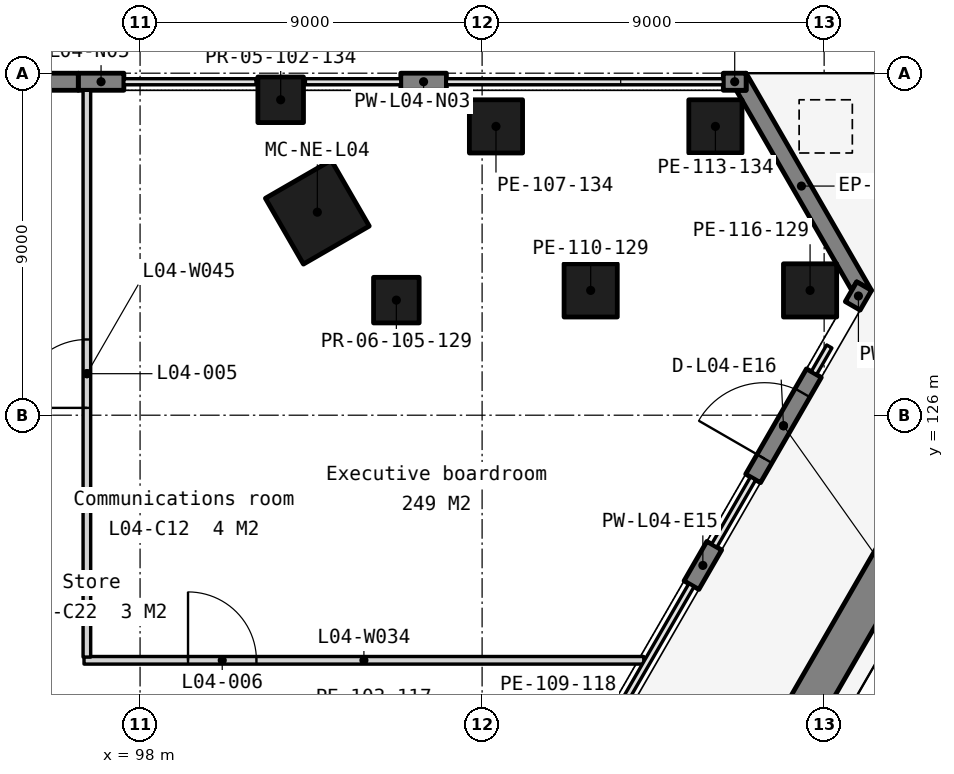
"""IFC4 building model, lengths in metres.
Left out: names, types, materials, properties, quantities, classifications, styles, units other than length and angle.
Written with IfcOpenShell. Run it as: python <this file> out.ifc"""

import sys

from ifc_helpers import new_model, si_unit, direction, frame, frame_2d, origin, origin_2d, place, context, subcontext, project, spatial, polyline, rectangle, outline, extrude, element, fill, save


model = new_model("IFC4")
c1 = context("Model", 3, precision=1e-05, world=origin(), true_north=direction((0.0, 1.0)))
c2 = subcontext(c1, "Body", "Model", "MODEL_VIEW")
j1 = project(units=[si_unit("LENGTHUNIT", "METRE"), si_unit("PLANEANGLEUNIT", "RADIAN")], contexts=[c1])
p1 = place(None, origin())
s1 = spatial("IfcSite", under=j1, at=p1, CompositionType="ELEMENT")
p2 = place(p1, origin())
s2 = spatial("IfcBuilding", under=s1, at=p2, CompositionType="ELEMENT")
p3 = place(p2, frame((0.0, 0.0, 25.0)))
s3 = spatial("IfcBuildingStorey", under=s2, at=p3, CompositionType="ELEMENT", Elevation=25.0)
for number, where, z_axis, x_axis in (
    (1, (107.365, 133.6, 0.0), (0.0, 0.0, 1.0), (1.0, 0.0, 0.0)),
    (2, (109.857, 129.284, 0.0), (0.0, 0.0, 1.0), (1.0, 0.0, 0.0)),
    (3, (113.139, 133.6, 0.0), (0.0, 0.0, 1.0), (1.0, 0.0, 0.0)),
    (4, (115.63, 129.284, 0.0), (0.0, 0.0, 1.0), (1.0, 0.0, 0.0)),
):
    element("IfcColumn", number, at=place(p3, frame(where, z_axis=z_axis, x_axis=x_axis)), inside=s3, PredefinedType="COLUMN", context=c2, shape_type="SweptSolid", body=[
        extrude(rectangle(XDim=1.4, YDim=1.4, at=origin_2d()), origin(), (0.0, 0.0, 1.0), 5.0),
    ])
for number, where, z_axis, x_axis in (
    (5, (101.7, 134.3, 0.0), (0.0, 0.0, 1.0), (1.0, 0.0, 0.0)),
    (6, (104.744, 129.028, 0.0), (0.0, 0.0, 1.0), (1.0, 0.0, 0.0)),
):
    element("IfcColumn", number, at=place(p3, frame(where, z_axis=z_axis, x_axis=x_axis)), inside=s3, PredefinedType="COLUMN", context=c2, shape_type="SweptSolid", body=[
        extrude(rectangle(XDim=1.2, YDim=1.2, at=origin_2d()), origin(), (0.0, 0.0, 1.0), 5.0),
    ])
p4 = place(p3, frame((102.664, 131.342, 0.0), z_axis=(0.0, 0.0, 1.0), x_axis=(-0.5, 0.866025403784, 0.0)))
e7 = element("IfcColumn", 7, at=p4, inside=s3, PredefinedType="COLUMN", context=c2, shape_type="SweptSolid", body=[
    extrude(rectangle(XDim=2.0, YDim=2.0, at=origin_2d()), origin(), (0.0, 0.0, 1.0), 5.0),
])
p5 = place(p3, frame((0.0, 0.0, -0.25)))
e8 = element("IfcWall", 8, at=p5, inside=s3, PredefinedType="SOLIDWALL", context=c2, shape_type="SweptSolid", body=[
    extrude(outline(polyline([(117.247, 129.284), (116.857, 129.509), (116.727, 129.284), (113.687, 134.55), (113.947, 134.55), (113.947, 135.0), (117.247, 129.284)])), origin(), (0.0, 0.0, 1.0), 4.262),
])
p6 = place(p3, frame((113.947, 134.775, -0.25), z_axis=(0.0, 0.0, 1.0), x_axis=(-1.0, 0.0, 0.0)))
e9 = element("IfcWall", 9, at=p6, inside=s3, PredefinedType="SOLIDWALL", context=c2, shape_type="SweptSolid", body=[
    extrude(rectangle(XDim=0.6, YDim=0.45, at=frame_2d((0.3, 0.0))), origin(), (0.0, 0.0, 1.0), 4.262),
])
for number, where, z_axis, x_axis in (
    (10, (106.06, 134.775, -0.25), (0.0, 0.0, 1.0), (-1.0, 0.0, 0.0)),
    (11, (97.573, 134.775, -0.25), (0.0, 0.0, 1.0), (-1.0, 0.0, 0.0)),
):
    element("IfcWall", number, at=place(p3, frame(where, z_axis=z_axis, x_axis=x_axis)), inside=s3, PredefinedType="SOLIDWALL", context=c2, shape_type="SweptSolid", body=[
        extrude(rectangle(XDim=1.2, YDim=0.45, at=frame_2d((0.6, 0.0))), origin(), (0.0, 0.0, 1.0), 4.262),
    ])
p7 = place(p3, frame((96.374, 134.775, -0.25), z_axis=(0.0, 0.0, 1.0), x_axis=(-1.0, 0.0, 0.0)))
e12 = element("IfcWall", 12, at=p7, inside=s3, PredefinedType="SOLIDWALL", context=c2, shape_type="SweptSolid", body=[
    extrude(rectangle(XDim=7.287, YDim=0.45, at=frame_2d((3.644, 0.0))), origin(), (0.0, 0.0, 1.0), 4.262),
])
p8 = place(p3, frame((112.509, 121.527, -0.25), z_axis=(0.0, 0.0, 1.0), x_axis=(0.500033551112, 0.866006032174, 0.0)))
e13 = element("IfcWall", 13, at=p8, inside=s3, PredefinedType="SOLIDWALL", context=c2, shape_type="SweptSolid", body=[
    extrude(rectangle(XDim=1.2, YDim=0.45, at=frame_2d((0.6, 0.0))), origin(), (0.0, 0.0, 1.0), 4.262),
])
p9 = place(p3, frame((114.13, 124.336, -0.25), z_axis=(0.0, 0.0, 1.0), x_axis=(0.500028443584, 0.866008981251, 0.0)))
e14 = element("IfcWall", 14, at=p9, inside=s3, PredefinedType="SOLIDWALL", context=c2, shape_type="SweptSolid", body=[
    extrude(rectangle(XDim=3.2, YDim=0.45, at=frame_2d((1.6, 0.0))), origin(), (0.0, 0.0, 1.0), 4.262),
])
p10 = place(p9, frame((0.6, 0.0, 0.25)))
e15 = element("IfcOpeningElement", 15, at=p10, cuts=e14, PredefinedType="OPENING", context=c2, shape_type="SweptSolid", body=[
    extrude(rectangle(XDim=2.0, YDim=2.4, at=frame_2d((1.0, 1.2))), frame((0.0, 0.235, 0.0), z_axis=(0.0, -1.0, 0.0), x_axis=(1.0, 0.0, 0.0)), (0.0, 0.0, 1.0), 0.47),
])
p11 = place(p3, frame((116.752, 128.877, -0.25), z_axis=(0.0, 0.0, 1.0), x_axis=(0.50012165622, 0.865955154139, 0.0)))
e16 = element("IfcWall", 16, at=p11, inside=s3, PredefinedType="SOLIDWALL", context=c2, shape_type="SweptSolid", body=[
    extrude(rectangle(XDim=0.6, YDim=0.45, at=frame_2d((0.3, 0.0))), origin(), (0.0, 0.0, 1.0), 4.262),
])
p12 = place(p3, frame((121.754, 129.091, 0.0), z_axis=(0.0, 0.0, 1.0), x_axis=(-0.500000102728, -0.866025344474, 0.0)))
e17 = element("IfcWall", 17, at=p12, inside=s3, PredefinedType="STANDARD", context=c2, shape_type="SweptSolid", body=[
    extrude(rectangle(XDim=77.841, YDim=1.0, at=frame_2d((38.92, 0.0))), origin(), (0.0, 0.0, 1.0), 0.6),
])
p13 = place(p3, frame((96.526, 119.55, 0.0), z_axis=(0.0, 0.0, 1.0), x_axis=(1.0, 0.0, 0.0)))
e18 = element("IfcWall", 18, at=p13, inside=s3, PredefinedType="PARTITIONING", context=c2, shape_type="SweptSolid", body=[
    extrude(rectangle(XDim=14.729, YDim=0.2, at=frame_2d((7.365, 0.0))), origin(), (0.0, 0.0, 1.0), 4.7),
])
p14 = place(p13, frame((2.736, 0.0, 0.0)))
e19 = element("IfcOpeningElement", 19, at=p14, cuts=e18, PredefinedType="OPENING", context=c2, shape_type="SweptSolid", body=[
    extrude(rectangle(XDim=1.8, YDim=2.1, at=frame_2d((0.9, 1.05))), frame((0.0, 0.11, 0.0), z_axis=(0.0, -1.0, 0.0), x_axis=(1.0, 0.0, 0.0)), (0.0, 0.0, 1.0), 0.22),
])
p15 = place(p3, frame((96.601, 119.635, 0.0), z_axis=(0.0, 0.0, 1.0), x_axis=(-3.2737511e-05, 0.999999999464, 0.0)))
e20 = element("IfcWall", 20, at=p15, inside=s3, PredefinedType="PARTITIONING", context=c2, shape_type="SweptSolid", body=[
    extrude(rectangle(XDim=14.915, YDim=0.2, at=frame_2d((7.458, 0.0))), origin(), (0.0, 0.0, 1.0), 4.7),
])
p16 = place(p15, frame((6.557, 0.0, 0.0)))
e21 = element("IfcOpeningElement", 21, at=p16, cuts=e20, PredefinedType="OPENING", context=c2, shape_type="SweptSolid", body=[
    extrude(rectangle(XDim=1.8, YDim=2.1, at=frame_2d((0.9, 1.05))), frame((0.0, 0.11, 0.0), z_axis=(0.0, -1.0, 0.0), x_axis=(1.0, 0.0, 0.0)), (0.0, 0.0, 1.0), 0.22),
])
p17 = place(p10, origin())
e22 = element("IfcDoor", 22, at=p17, inside=s3, OperationType="DOUBLE_DOOR_SINGLE_SWING", PredefinedType="DOOR", context=c2, shape_type="SweptSolid", body=[
    extrude(rectangle(XDim=2.0, YDim=2.4, at=frame_2d((1.0, 1.2))), frame((0.0, 0.025, 0.0), z_axis=(0.0, -1.0, 0.0), x_axis=(1.0, 0.0, 0.0)), (0.0, 0.0, 1.0), 0.05),
])
fill(e15, e22)
p18 = place(p16, origin())
e23 = element("IfcDoor", 23, at=p18, inside=s3, OperationType="SINGLE_SWING_LEFT", PredefinedType="DOOR", context=c2, shape_type="SweptSolid", body=[
    extrude(rectangle(XDim=1.8, YDim=2.1, at=frame_2d((0.9, 1.05))), frame((0.0, 0.025, 0.0), z_axis=(0.0, -1.0, 0.0), x_axis=(1.0, 0.0, 0.0)), (0.0, 0.0, 1.0), 0.05),
])
fill(e21, e23)
p19 = place(p14, origin())
e24 = element("IfcDoor", 24, at=p19, inside=s3, OperationType="SINGLE_SWING_LEFT", PredefinedType="DOOR", context=c2, shape_type="SweptSolid", body=[
    extrude(rectangle(XDim=1.8, YDim=2.1, at=frame_2d((0.9, 1.05))), frame((0.0, 0.025, 0.0), z_axis=(0.0, -1.0, 0.0), x_axis=(1.0, 0.0, 0.0)), (0.0, 0.0, 1.0), 0.05),
])
fill(e19, e24)
save(model, sys.argv[1])
